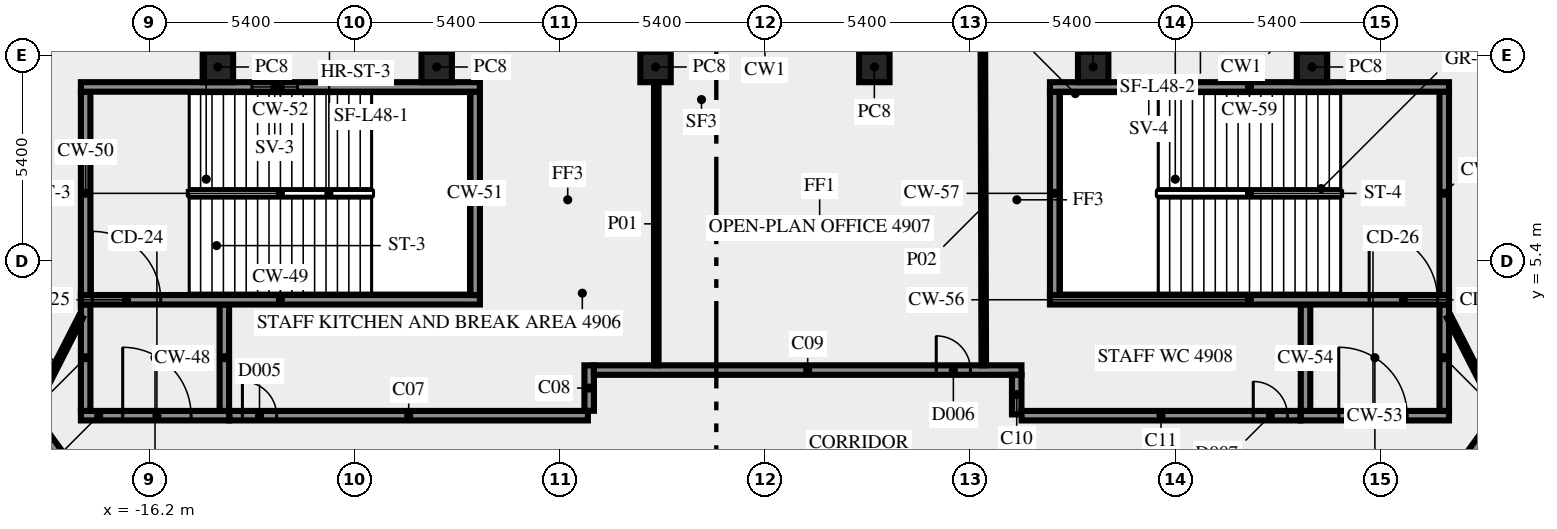
"""IFC4 building model, lengths in metres.
Left out: names, types, materials, properties, quantities, classifications, styles, units other than length and angle.
Written with IfcOpenShell. Run it as: python <this file> out.ifc"""

import sys

from ifc_helpers import new_model, si_unit, direction, frame, frame_2d, origin, origin_2d, place, context, subcontext, project, spatial, rectangle, extrude, element, fill, save


model = new_model("IFC4")
c1 = context("Model", 3, precision=1e-05, world=origin(), true_north=direction((0.0, 1.0)))
c2 = subcontext(c1, "Body", "Model", "MODEL_VIEW")
j1 = project(units=[si_unit("LENGTHUNIT", "METRE"), si_unit("PLANEANGLEUNIT", "RADIAN")], contexts=[c1])
p1 = place(None, origin())
s1 = spatial("IfcSite", under=j1, at=p1, CompositionType="ELEMENT")
p2 = place(p1, origin())
s2 = spatial("IfcBuilding", under=s1, at=p2, CompositionType="ELEMENT")
p3 = place(p2, frame((0.0, 0.0, 210.0)))
s3 = spatial("IfcBuildingStorey", under=s2, at=p3, CompositionType="ELEMENT", Elevation=210.0)
for number, where, z_axis, x_axis in (
    (1, (14.395, 10.5, 0.0), (0.0, 0.0, 1.0), (-1.0, 0.0, 0.0)),
    (2, (8.637, 10.5, 0.0), (0.0, 0.0, 1.0), (-1.0, 0.0, 0.0)),
    (3, (2.879, 10.5, 0.0), (0.0, 0.0, 1.0), (-1.0, 0.0, 0.0)),
    (4, (-2.879, 10.5, 0.0), (0.0, 0.0, 1.0), (-1.0, 0.0, 0.0)),
    (5, (-8.637, 10.5, 0.0), (0.0, 0.0, 1.0), (-1.0, 0.0, 0.0)),
    (6, (-14.395, 10.5, 0.0), (0.0, 0.0, 1.0), (-1.0, 0.0, 0.0)),
):
    element("IfcColumn", number, at=place(p3, frame(where, z_axis=z_axis, x_axis=x_axis)), inside=s3, PredefinedType="COLUMN", context=c2, shape_type="SweptSolid", body=[
        extrude(rectangle(XDim=0.8, YDim=0.8, at=origin_2d()), origin(), (0.0, 0.0, 1.0), 3.65),
    ])
p4 = place(p3, frame((-18.0, 1.325, 0.0), z_axis=(0.0, 0.0, 1.0), x_axis=(1.0, 0.0, 0.0)))
e7 = element("IfcWall", 7, at=p4, inside=s3, PredefinedType="SHEAR", context=c2, shape_type="SweptSolid", body=[
    extrude(rectangle(XDim=3.9, YDim=0.25, at=frame_2d((1.95, 0.0))), origin(), (0.0, 0.0, 1.0), 3.65),
])
p5 = place(p4, frame((1.1, 0.0, 0.0)))
e8 = element("IfcOpeningElement", 8, at=p5, cuts=e7, PredefinedType="OPENING", context=c2, shape_type="SweptSolid", body=[
    extrude(rectangle(XDim=1.8, YDim=2.1, at=frame_2d((0.9, 1.05))), frame((0.0, 0.135, 0.0), z_axis=(0.0, -1.0, 0.0), x_axis=(1.0, 0.0, 0.0)), (0.0, 0.0, 1.0), 0.27),
])
for number, where, z_axis, x_axis in (
    (9, (-17.875, 1.45, 0.0), (0.0, 0.0, 1.0), (0.0, 1.0, 0.0)),
    (10, (-14.225, 1.45, 0.0), (0.0, 0.0, 1.0), (0.0, 1.0, 0.0)),
):
    element("IfcWall", number, at=place(p3, frame(where, z_axis=z_axis, x_axis=x_axis)), inside=s3, PredefinedType="SHEAR", context=c2, shape_type="SweptSolid", body=[
        extrude(rectangle(XDim=2.8, YDim=0.25, at=frame_2d((1.4, 0.0))), origin(), (0.0, 0.0, 1.0), 3.65),
    ])
p6 = place(p3, frame((-18.0, 4.375, 0.0), z_axis=(0.0, 0.0, 1.0), x_axis=(1.0, 0.0, 0.0)))
e11 = element("IfcWall", 11, at=p6, inside=s3, PredefinedType="SHEAR", context=c2, shape_type="SweptSolid", body=[
    extrude(rectangle(XDim=10.5, YDim=0.25, at=frame_2d((5.25, 0.0))), origin(), (0.0, 0.0, 1.0), 3.65),
])
p7 = place(p6, frame((0.3, 0.0, 0.0)))
e12 = element("IfcOpeningElement", 12, at=p7, cuts=e11, PredefinedType="OPENING", context=c2, shape_type="SweptSolid", body=[
    extrude(rectangle(XDim=1.8, YDim=2.1, at=frame_2d((0.9, 1.05))), frame((0.0, 0.135, 0.0), z_axis=(0.0, -1.0, 0.0), x_axis=(1.0, 0.0, 0.0)), (0.0, 0.0, 1.0), 0.27),
])
for number, where, z_axis, x_axis in (
    (13, (-17.875, 4.5, 0.0), (0.0, 0.0, 1.0), (0.0, 1.0, 0.0)),
    (14, (-7.625, 4.5, 0.0), (0.0, 0.0, 1.0), (0.0, 1.0, 0.0)),
):
    element("IfcWall", number, at=place(p3, frame(where, z_axis=z_axis, x_axis=x_axis)), inside=s3, PredefinedType="SHEAR", context=c2, shape_type="SweptSolid", body=[
        extrude(rectangle(XDim=5.35, YDim=0.25, at=frame_2d((2.675, 0.0))), origin(), (0.0, 0.0, 1.0), 3.65),
    ])
p8 = place(p3, frame((-18.0, 9.975, 0.0), z_axis=(0.0, 0.0, 1.0), x_axis=(1.0, 0.0, 0.0)))
e15 = element("IfcWall", 15, at=p8, inside=s3, PredefinedType="SHEAR", context=c2, shape_type="SweptSolid", body=[
    extrude(rectangle(XDim=10.5, YDim=0.25, at=frame_2d((5.25, 0.0))), origin(), (0.0, 0.0, 1.0), 3.65),
])
p9 = place(p8, frame((4.5, 0.0, 1.0)))
e16 = element("IfcOpeningElement", 16, at=p9, cuts=e15, PredefinedType="OPENING", context=c2, shape_type="SweptSolid", body=[
    extrude(rectangle(XDim=1.2, YDim=1.2, at=frame_2d((0.6, 0.6))), frame((0.0, 0.135, 0.0), z_axis=(0.0, -1.0, 0.0), x_axis=(1.0, 0.0, 0.0)), (0.0, 0.0, 1.0), 0.27),
])
p10 = place(p3, frame((14.1, 1.325, 0.0), z_axis=(0.0, 0.0, 1.0), x_axis=(1.0, 0.0, 0.0)))
e17 = element("IfcWall", 17, at=p10, inside=s3, PredefinedType="SHEAR", context=c2, shape_type="SweptSolid", body=[
    extrude(rectangle(XDim=3.9, YDim=0.25, at=frame_2d((1.95, 0.0))), origin(), (0.0, 0.0, 1.0), 3.65),
])
p11 = place(p10, frame((1.0, 0.0, 0.0)))
e18 = element("IfcOpeningElement", 18, at=p11, cuts=e17, PredefinedType="OPENING", context=c2, shape_type="SweptSolid", body=[
    extrude(rectangle(XDim=1.8, YDim=2.1, at=frame_2d((0.9, 1.05))), frame((0.0, 0.135, 0.0), z_axis=(0.0, -1.0, 0.0), x_axis=(1.0, 0.0, 0.0)), (0.0, 0.0, 1.0), 0.27),
])
for number, where, z_axis, x_axis in (
    (19, (14.225, 1.45, 0.0), (0.0, 0.0, 1.0), (0.0, 1.0, 0.0)),
    (20, (17.875, 1.45, 0.0), (0.0, 0.0, 1.0), (0.0, 1.0, 0.0)),
):
    element("IfcWall", number, at=place(p3, frame(where, z_axis=z_axis, x_axis=x_axis)), inside=s3, PredefinedType="SHEAR", context=c2, shape_type="SweptSolid", body=[
        extrude(rectangle(XDim=2.8, YDim=0.25, at=frame_2d((1.4, 0.0))), origin(), (0.0, 0.0, 1.0), 3.65),
    ])
p12 = place(p3, frame((7.5, 4.375, 0.0), z_axis=(0.0, 0.0, 1.0), x_axis=(1.0, 0.0, 0.0)))
e21 = element("IfcWall", 21, at=p12, inside=s3, PredefinedType="SHEAR", context=c2, shape_type="SweptSolid", body=[
    extrude(rectangle(XDim=10.5, YDim=0.25, at=frame_2d((5.25, 0.0))), origin(), (0.0, 0.0, 1.0), 3.65),
])
p13 = place(p12, frame((8.4, 0.0, 0.0)))
e22 = element("IfcOpeningElement", 22, at=p13, cuts=e21, PredefinedType="OPENING", context=c2, shape_type="SweptSolid", body=[
    extrude(rectangle(XDim=1.8, YDim=2.1, at=frame_2d((0.9, 1.05))), frame((0.0, 0.135, 0.0), z_axis=(0.0, -1.0, 0.0), x_axis=(1.0, 0.0, 0.0)), (0.0, 0.0, 1.0), 0.27),
])
for number, where, z_axis, x_axis in (
    (23, (7.625, 4.5, 0.0), (0.0, 0.0, 1.0), (0.0, 1.0, 0.0)),
    (24, (17.875, 4.5, 0.0), (0.0, 0.0, 1.0), (0.0, 1.0, 0.0)),
):
    element("IfcWall", number, at=place(p3, frame(where, z_axis=z_axis, x_axis=x_axis)), inside=s3, PredefinedType="SHEAR", context=c2, shape_type="SweptSolid", body=[
        extrude(rectangle(XDim=5.35, YDim=0.25, at=frame_2d((2.675, 0.0))), origin(), (0.0, 0.0, 1.0), 3.65),
    ])
p14 = place(p3, frame((7.5, 9.975, 0.0), z_axis=(0.0, 0.0, 1.0), x_axis=(1.0, 0.0, 0.0)))
e25 = element("IfcWall", 25, at=p14, inside=s3, PredefinedType="SHEAR", context=c2, shape_type="SweptSolid", body=[
    extrude(rectangle(XDim=10.5, YDim=0.25, at=frame_2d((5.25, 0.0))), origin(), (0.0, 0.0, 1.0), 3.65),
])
p15 = place(p14, frame((2.0, 0.0, 1.0)))
e26 = element("IfcOpeningElement", 26, at=p15, cuts=e25, PredefinedType="OPENING", context=c2, shape_type="SweptSolid", body=[
    extrude(rectangle(XDim=1.2, YDim=1.2, at=frame_2d((0.6, 0.6))), frame((0.0, 0.135, 0.0), z_axis=(0.0, -1.0, 0.0), x_axis=(1.0, 0.0, 0.0)), (0.0, 0.0, 1.0), 0.27),
])
p16 = place(p3, frame((17.545, -1.125, 0.0), z_axis=(0.0, 0.0, 1.0), x_axis=(0.58779555165, 0.809009511354, 0.0)))
e27 = element("IfcWall", 27, at=p16, inside=s3, PredefinedType="SOLIDWALL", context=c2, shape_type="SweptSolid", body=[
    extrude(rectangle(XDim=18.103, YDim=0.25, at=frame_2d((9.052, 0.0))), origin(), (0.0, 0.0, 1.0), 3.65),
])
p17 = place(p16, frame((16.728, 0.0, 0.0)))
e28 = element("IfcOpeningElement", 28, at=p17, cuts=e27, PredefinedType="OPENING", context=c2, shape_type="SweptSolid", body=[
    extrude(rectangle(XDim=0.9, YDim=2.1, at=frame_2d((0.45, 1.05))), frame((0.0, 0.135, 0.0), z_axis=(0.0, -1.0, 0.0), x_axis=(1.0, 0.0, 0.0)), (0.0, 0.0, 1.0), 0.27),
])
p18 = place(p3, frame((-31.918, 18.658, 0.0), z_axis=(0.0, 0.0, 1.0), x_axis=(0.587788731405, -0.80901446664, 0.0)))
e29 = element("IfcWall", 29, at=p18, inside=s3, PredefinedType="SOLIDWALL", context=c2, shape_type="SweptSolid", body=[
    extrude(rectangle(XDim=24.453, YDim=0.25, at=frame_2d((12.227, 0.0))), origin(), (0.0, 0.0, 1.0), 3.65),
])
p19 = place(p18, frame((20.112, 0.0, 0.0)))
e30 = element("IfcOpeningElement", 30, at=p19, cuts=e29, PredefinedType="OPENING", context=c2, shape_type="SweptSolid", body=[
    extrude(rectangle(XDim=0.9, YDim=2.1, at=frame_2d((0.45, 1.05))), frame((0.0, 0.135, 0.0), z_axis=(0.0, -1.0, 0.0), x_axis=(1.0, 0.0, 0.0)), (0.0, 0.0, 1.0), 0.27),
])
p20 = place(p18, frame((4.445, 0.0, 0.0)))
e31 = element("IfcOpeningElement", 31, at=p20, cuts=e29, PredefinedType="OPENING", context=c2, shape_type="SweptSolid", body=[
    extrude(rectangle(XDim=0.9, YDim=2.1, at=frame_2d((0.45, 1.05))), frame((0.0, 0.135, 0.0), z_axis=(0.0, -1.0, 0.0), x_axis=(1.0, 0.0, 0.0)), (0.0, 0.0, 1.0), 0.27),
])
p21 = place(p3, frame((-14.09, 1.325, 0.0), z_axis=(0.0, 0.0, 1.0), x_axis=(1.0, 0.0, 0.0)))
e32 = element("IfcWall", 32, at=p21, inside=s3, PredefinedType="SOLIDWALL", context=c2, shape_type="SweptSolid", body=[
    extrude(rectangle(XDim=9.431, YDim=0.25, at=frame_2d((4.716, 0.0))), origin(), (0.0, 0.0, 1.0), 3.65),
])
p22 = place(p21, frame((0.34, 0.0, 0.0)))
e33 = element("IfcOpeningElement", 33, at=p22, cuts=e32, PredefinedType="OPENING", context=c2, shape_type="SweptSolid", body=[
    extrude(rectangle(XDim=0.9, YDim=2.1, at=frame_2d((0.45, 1.05))), frame((0.0, 0.135, 0.0), z_axis=(0.0, -1.0, 0.0), x_axis=(1.0, 0.0, 0.0)), (0.0, 0.0, 1.0), 0.27),
])
p23 = place(p3, frame((-4.625, 1.454, 0.0), z_axis=(0.0, 0.0, 1.0), x_axis=(0.0, 1.0, 0.0)))
e34 = element("IfcWall", 34, at=p23, inside=s3, PredefinedType="SOLIDWALL", context=c2, shape_type="SweptSolid", body=[
    extrude(rectangle(XDim=1.196, YDim=0.25, at=frame_2d((0.598, 0.0))), origin(), (0.0, 0.0, 1.0), 3.65),
])
p24 = place(p3, frame((-4.5, 2.525, 0.0), z_axis=(0.0, 0.0, 1.0), x_axis=(1.0, 0.0, 0.0)))
e35 = element("IfcWall", 35, at=p24, inside=s3, PredefinedType="SOLIDWALL", context=c2, shape_type="SweptSolid", body=[
    extrude(rectangle(XDim=11.25, YDim=0.25, at=frame_2d((5.625, 0.0))), origin(), (0.0, 0.0, 1.0), 3.65),
])
p25 = place(p24, frame((9.008, 0.0, 0.0)))
e36 = element("IfcOpeningElement", 36, at=p25, cuts=e35, PredefinedType="OPENING", context=c2, shape_type="SweptSolid", body=[
    extrude(rectangle(XDim=0.9, YDim=2.1, at=frame_2d((0.45, 1.05))), frame((0.0, 0.135, 0.0), z_axis=(0.0, -1.0, 0.0), x_axis=(1.0, 0.0, 0.0)), (0.0, 0.0, 1.0), 0.27),
])
p26 = place(p3, frame((6.625, 2.4, 0.0), z_axis=(0.0, 0.0, 1.0), x_axis=(0.0, -1.0, 0.0)))
e37 = element("IfcWall", 37, at=p26, inside=s3, PredefinedType="SOLIDWALL", context=c2, shape_type="SweptSolid", body=[
    extrude(rectangle(XDim=1.041, YDim=0.25, at=frame_2d((0.521, 0.0))), origin(), (0.0, 0.0, 1.0), 3.65),
])
p27 = place(p3, frame((6.754, 1.325, 0.0), z_axis=(0.0, 0.0, 1.0), x_axis=(1.0, 0.0, 0.0)))
e38 = element("IfcWall", 38, at=p27, inside=s3, PredefinedType="SOLIDWALL", context=c2, shape_type="SweptSolid", body=[
    extrude(rectangle(XDim=7.336, YDim=0.25, at=frame_2d((3.668, 0.0))), origin(), (0.0, 0.0, 1.0), 3.65),
])
p28 = place(p27, frame((6.096, 0.0, 0.0)))
e39 = element("IfcOpeningElement", 39, at=p28, cuts=e38, PredefinedType="OPENING", context=c2, shape_type="SweptSolid", body=[
    extrude(rectangle(XDim=0.9, YDim=2.1, at=frame_2d((0.45, 1.05))), frame((0.0, 0.135, 0.0), z_axis=(0.0, -1.0, 0.0), x_axis=(1.0, 0.0, 0.0)), (0.0, 0.0, 1.0), 0.27),
])
p29 = place(p3, frame((-2.859, 10.095, 0.0), z_axis=(0.0, 0.0, 1.0), x_axis=(0.0, -1.0, 0.0)))
e40 = element("IfcWall", 40, at=p29, inside=s3, PredefinedType="PARTITIONING", context=c2, shape_type="SweptSolid", body=[
    extrude(rectangle(XDim=7.445, YDim=0.12, at=frame_2d((3.723, 0.0))), origin(), (0.0, 0.0, 1.0), 3.65),
])
p30 = place(p3, frame((5.758, 2.65, 0.0), z_axis=(0.0, 0.0, 1.0), x_axis=(-0.002748366908, 0.999996223233, 0.0)))
e41 = element("IfcWall", 41, at=p30, inside=s3, PredefinedType="PARTITIONING", context=c2, shape_type="SweptSolid", body=[
    extrude(rectangle(XDim=8.35, YDim=0.12, at=frame_2d((4.175, 0.0))), origin(), (0.0, 0.0, 1.0), 2.85),
])
for number, where, z_axis, x_axis in (
    (42, (-19.261, 1.45, 0.0), (0.0, 0.0, 1.0), (0.454, 0.891, 0.0)),
    (43, (18.0, 3.925, 0.0), (0.0, 0.0, 1.0), (0.454, -0.891, 0.0)),
):
    element("IfcWall", number, at=place(p3, frame(where, z_axis=z_axis, x_axis=x_axis)), inside=s3, PredefinedType="PARTITIONING", context=c2, shape_type="SweptSolid", body=[
        extrude(rectangle(XDim=2.778, YDim=0.12, at=frame_2d((1.389, 0.0))), origin(), (0.0, 0.0, 1.0), 3.65),
    ])
p31 = place(p5, origin())
e44 = element("IfcDoor", 44, at=p31, inside=s3, OperationType="DOUBLE_DOOR_SINGLE_SWING", PredefinedType="DOOR", context=c2, shape_type="SweptSolid", body=[
    extrude(rectangle(XDim=1.8, YDim=2.1, at=frame_2d((0.9, 1.05))), frame((0.0, 0.025, 0.0), z_axis=(0.0, -1.0, 0.0), x_axis=(1.0, 0.0, 0.0)), (0.0, 0.0, 1.0), 0.05),
])
fill(e8, e44)
p32 = place(p7, origin())
e45 = element("IfcDoor", 45, at=p32, inside=s3, OperationType="DOUBLE_DOOR_SINGLE_SWING", PredefinedType="DOOR", context=c2, shape_type="SweptSolid", body=[
    extrude(rectangle(XDim=1.8, YDim=2.1, at=frame_2d((0.9, 1.05))), frame((0.0, 0.025, 0.0), z_axis=(0.0, -1.0, 0.0), x_axis=(1.0, 0.0, 0.0)), (0.0, 0.0, 1.0), 0.05),
])
fill(e12, e45)
p33 = place(p9, origin())
e46 = element("IfcWindow", 46, at=p33, inside=s3, PartitioningType="SINGLE_PANEL", PredefinedType="WINDOW", context=c2, shape_type="SweptSolid", body=[
    extrude(rectangle(XDim=1.2, YDim=1.2, at=frame_2d((0.6, 0.6))), frame((0.0, 0.03, 0.0), z_axis=(0.0, -1.0, 0.0), x_axis=(1.0, 0.0, 0.0)), (0.0, 0.0, 1.0), 0.06),
])
fill(e16, e46)
p34 = place(p11, origin())
e47 = element("IfcDoor", 47, at=p34, inside=s3, OperationType="DOUBLE_DOOR_SINGLE_SWING", PredefinedType="DOOR", context=c2, shape_type="SweptSolid", body=[
    extrude(rectangle(XDim=1.8, YDim=2.1, at=frame_2d((0.9, 1.05))), frame((0.0, 0.025, 0.0), z_axis=(0.0, -1.0, 0.0), x_axis=(1.0, 0.0, 0.0)), (0.0, 0.0, 1.0), 0.05),
])
fill(e18, e47)
p35 = place(p13, origin())
e48 = element("IfcDoor", 48, at=p35, inside=s3, OperationType="DOUBLE_DOOR_SINGLE_SWING", PredefinedType="DOOR", context=c2, shape_type="SweptSolid", body=[
    extrude(rectangle(XDim=1.8, YDim=2.1, at=frame_2d((0.9, 1.05))), frame((0.0, 0.025, 0.0), z_axis=(0.0, -1.0, 0.0), x_axis=(1.0, 0.0, 0.0)), (0.0, 0.0, 1.0), 0.05),
])
fill(e22, e48)
p36 = place(p15, origin())
e49 = element("IfcWindow", 49, at=p36, inside=s3, PartitioningType="SINGLE_PANEL", PredefinedType="WINDOW", context=c2, shape_type="SweptSolid", body=[
    extrude(rectangle(XDim=1.2, YDim=1.2, at=frame_2d((0.6, 0.6))), frame((0.0, 0.03, 0.0), z_axis=(0.0, -1.0, 0.0), x_axis=(1.0, 0.0, 0.0)), (0.0, 0.0, 1.0), 0.06),
])
fill(e26, e49)
p37 = place(p25, origin())
e50 = element("IfcDoor", 50, at=p37, inside=s3, OperationType="SINGLE_SWING_RIGHT", PredefinedType="DOOR", context=c2, shape_type="SweptSolid", body=[
    extrude(rectangle(XDim=0.9, YDim=2.1, at=frame_2d((0.45, 1.05))), frame((0.0, 0.025, 0.0), z_axis=(0.0, -1.0, 0.0), x_axis=(1.0, 0.0, 0.0)), (0.0, 0.0, 1.0), 0.05),
])
fill(e36, e50)
p38 = place(p22, origin())
e51 = element("IfcDoor", 51, at=p38, inside=s3, OperationType="SINGLE_SWING_LEFT", PredefinedType="DOOR", context=c2, shape_type="SweptSolid", body=[
    extrude(rectangle(XDim=0.9, YDim=2.1, at=frame_2d((0.45, 1.05))), frame((0.0, 0.025, 0.0), z_axis=(0.0, -1.0, 0.0), x_axis=(1.0, 0.0, 0.0)), (0.0, 0.0, 1.0), 0.05),
])
fill(e33, e51)
p39 = place(p28, origin())
e52 = element("IfcDoor", 52, at=p39, inside=s3, OperationType="SINGLE_SWING_RIGHT", PredefinedType="DOOR", context=c2, shape_type="SweptSolid", body=[
    extrude(rectangle(XDim=0.9, YDim=2.1, at=frame_2d((0.45, 1.05))), frame((0.0, 0.025, 0.0), z_axis=(0.0, -1.0, 0.0), x_axis=(1.0, 0.0, 0.0)), (0.0, 0.0, 1.0), 0.05),
])
fill(e39, e52)
save(model, sys.argv[1])
